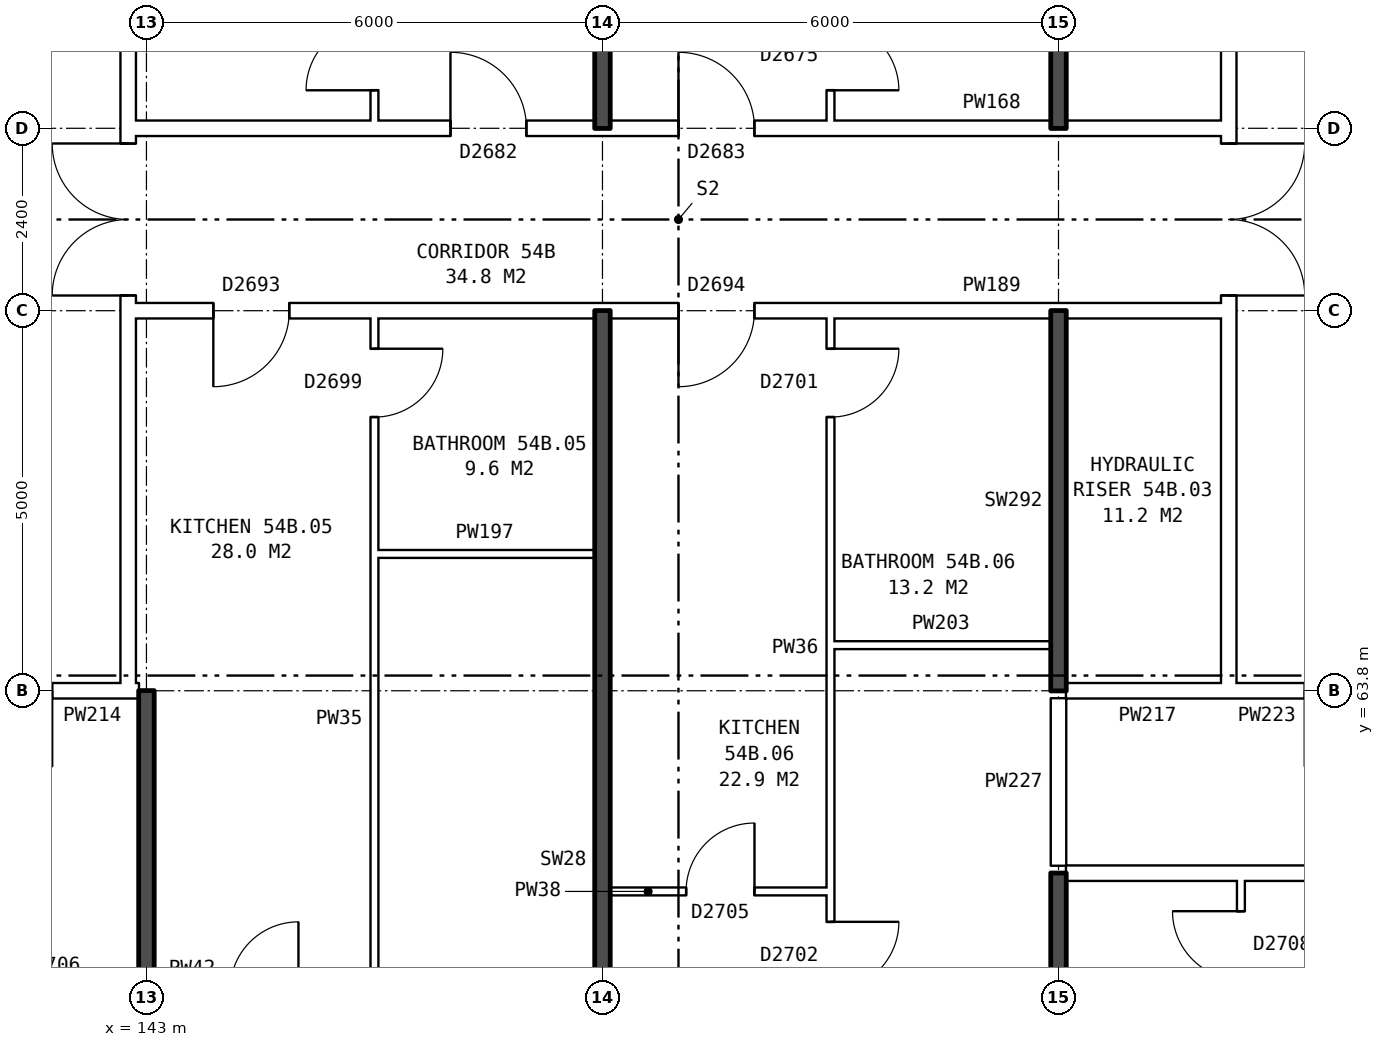
"""IFC4 building model, lengths in metres.
Left out: names, types, materials, properties, quantities, classifications, styles, units other than length and angle.
Written with IfcOpenShell. Run it as: python <this file> out.ifc"""

import sys

from ifc_helpers import new_model, si_unit, direction, frame, frame_2d, origin, place, context, subcontext, project, spatial, rectangle, extrude, element, fill, save


model = new_model("IFC4")
c1 = context("Model", 3, precision=1e-05, world=origin(), true_north=direction((0.0, 1.0)))
c2 = subcontext(c1, "Body", "Model", "MODEL_VIEW")
j1 = project(units=[si_unit("LENGTHUNIT", "METRE"), si_unit("PLANEANGLEUNIT", "RADIAN")], contexts=[c1])
p1 = place(None, origin())
s1 = spatial("IfcSite", under=j1, at=p1, CompositionType="ELEMENT")
p2 = place(p1, origin())
s2 = spatial("IfcBuilding", under=s1, at=p2, CompositionType="ELEMENT")
p3 = place(p2, frame((0.0, 0.0, 191.3)))
s3 = spatial("IfcBuildingStorey", under=s2, at=p3, CompositionType="ELEMENT", Elevation=191.3)
p4 = place(p3, frame((142.76, 63.9, 0.0), z_axis=(0.0, 0.0, 1.0), x_axis=(0.0, 1.0, 0.0)))
e1 = element("IfcWall", 1, at=p4, inside=s3, PredefinedType="PARTITIONING", context=c2, shape_type="SweptSolid", body=[
    extrude(rectangle(XDim=12.2, YDim=0.2, at=frame_2d((6.1, 0.0))), origin(), (0.0, 0.0, 1.0), 2.85),
])
p5 = place(p4, frame((5.1, 0.0, 0.0)))
e2 = element("IfcOpeningElement", 2, at=p5, cuts=e1, PredefinedType="OPENING", context=c2, shape_type="SweptSolid", body=[
    extrude(rectangle(XDim=2.0, YDim=2.1, at=frame_2d((1.0, 1.05))), frame((0.0, 0.11, 0.0), z_axis=(0.0, -1.0, 0.0), x_axis=(1.0, 0.0, 0.0)), (0.0, 0.0, 1.0), 0.22),
])
p6 = place(p3, frame((157.24, 63.9, 0.0), z_axis=(0.0, 0.0, 1.0), x_axis=(0.0, 1.0, 0.0)))
e3 = element("IfcWall", 3, at=p6, inside=s3, PredefinedType="PARTITIONING", context=c2, shape_type="SweptSolid", body=[
    extrude(rectangle(XDim=12.2, YDim=0.2, at=frame_2d((6.1, 0.0))), origin(), (0.0, 0.0, 1.0), 2.85),
])
p7 = place(p6, frame((5.1, 0.0, 0.0)))
e4 = element("IfcOpeningElement", 4, at=p7, cuts=e3, PredefinedType="OPENING", context=c2, shape_type="SweptSolid", body=[
    extrude(rectangle(XDim=2.0, YDim=2.1, at=frame_2d((1.0, 1.05))), frame((0.0, 0.11, 0.0), z_axis=(0.0, -1.0, 0.0), x_axis=(1.0, 0.0, 0.0)), (0.0, 0.0, 1.0), 0.22),
])
p8 = place(p3, frame((149.1, 61.16, 0.0), z_axis=(0.0, 0.0, 1.0), x_axis=(1.0, 0.0, 0.0)))
e5 = element("IfcWall", 5, at=p8, inside=s3, PredefinedType="PARTITIONING", context=c2, shape_type="SweptSolid", body=[
    extrude(rectangle(XDim=2.9, YDim=0.1, at=frame_2d((1.45, 0.0))), origin(), (0.0, 0.0, 1.0), 2.85),
])
p9 = place(p8, frame((1.0, 0.0, 0.0)))
e6 = element("IfcOpeningElement", 6, at=p9, cuts=e5, PredefinedType="OPENING", context=c2, shape_type="SweptSolid", body=[
    extrude(rectangle(XDim=0.9, YDim=2.1, at=frame_2d((0.45, 1.05))), frame((0.0, 0.06, 0.0), z_axis=(0.0, -1.0, 0.0), x_axis=(1.0, 0.0, 0.0)), (0.0, 0.0, 1.0), 0.12),
])
p10 = place(p3, frame((155.1, 61.4, 0.0), z_axis=(0.0, 0.0, 1.0), x_axis=(1.0, 0.0, 0.0)))
e7 = element("IfcWall", 7, at=p10, inside=s3, PredefinedType="PARTITIONING", context=c2, shape_type="SweptSolid", body=[
    extrude(rectangle(XDim=14.79, YDim=0.2, at=frame_2d((7.395, 0.0))), origin(), (0.0, 0.0, 1.0), 2.85),
])
p11 = place(p10, frame((3.6, 0.0, 0.0)))
e8 = element("IfcOpeningElement", 8, at=p11, cuts=e7, PredefinedType="OPENING", context=c2, shape_type="SweptSolid", body=[
    extrude(rectangle(XDim=1.0, YDim=2.1, at=frame_2d((0.5, 1.05))), frame((0.0, 0.11, 0.0), z_axis=(0.0, -1.0, 0.0), x_axis=(1.0, 0.0, 0.0)), (0.0, 0.0, 1.0), 0.22),
])
p12 = place(p10, frame((11.045, 0.0, 0.0)))
e9 = element("IfcOpeningElement", 9, at=p12, cuts=e7, PredefinedType="OPENING", context=c2, shape_type="SweptSolid", body=[
    extrude(rectangle(XDim=1.0, YDim=2.1, at=frame_2d((0.5, 1.05))), frame((0.0, 0.11, 0.0), z_axis=(0.0, -1.0, 0.0), x_axis=(1.0, 0.0, 0.0)), (0.0, 0.0, 1.0), 0.22),
])
p13 = place(p3, frame((139.76, 63.8, 0.0), z_axis=(0.0, 0.0, 1.0), x_axis=(1.0, 0.0, 0.0)))
e10 = element("IfcWall", 10, at=p13, inside=s3, PredefinedType="PARTITIONING", context=c2, shape_type="SweptSolid", body=[
    extrude(rectangle(XDim=3.0, YDim=0.2, at=frame_2d((1.5, 0.0))), origin(), (0.0, 0.0, 1.0), 2.85),
])
p14 = place(p13, frame((1.0, 0.0, 0.0)))
e11 = element("IfcOpeningElement", 11, at=p14, cuts=e10, PredefinedType="OPENING", context=c2, shape_type="SweptSolid", body=[
    extrude(rectangle(XDim=1.0, YDim=2.1, at=frame_2d((0.5, 1.05))), frame((0.0, 0.11, 0.0), z_axis=(0.0, -1.0, 0.0), x_axis=(1.0, 0.0, 0.0)), (0.0, 0.0, 1.0), 0.22),
])
p15 = place(p3, frame((142.76, 63.8, 0.0), z_axis=(0.0, 0.0, 1.0), x_axis=(1.0, 0.0, 0.0)))
e12 = element("IfcWall", 12, at=p15, inside=s3, PredefinedType="PARTITIONING", context=c2, shape_type="SweptSolid", body=[
    extrude(rectangle(XDim=0.14, YDim=0.2, at=frame_2d((0.07, 0.0))), origin(), (0.0, 0.0, 1.0), 2.85),
])
p16 = place(p3, frame((155.1, 63.8, 0.0), z_axis=(0.0, 0.0, 1.0), x_axis=(1.0, 0.0, 0.0)))
e13 = element("IfcWall", 13, at=p16, inside=s3, PredefinedType="PARTITIONING", context=c2, shape_type="SweptSolid", body=[
    extrude(rectangle(XDim=2.14, YDim=0.2, at=frame_2d((1.07, 0.0))), origin(), (0.0, 0.0, 1.0), 2.85),
])
p17 = place(p3, frame((157.24, 63.8, 0.0), z_axis=(0.0, 0.0, 1.0), x_axis=(1.0, 0.0, 0.0)))
e14 = element("IfcWall", 14, at=p17, inside=s3, PredefinedType="PARTITIONING", context=c2, shape_type="SweptSolid", body=[
    extrude(rectangle(XDim=3.0, YDim=0.2, at=frame_2d((1.5, 0.0))), origin(), (0.0, 0.0, 1.0), 2.85),
])
p18 = place(p17, frame((1.0, 0.0, 0.0)))
e15 = element("IfcOpeningElement", 15, at=p18, cuts=e14, PredefinedType="OPENING", context=c2, shape_type="SweptSolid", body=[
    extrude(rectangle(XDim=1.0, YDim=2.1, at=frame_2d((0.5, 1.05))), frame((0.0, 0.11, 0.0), z_axis=(0.0, -1.0, 0.0), x_axis=(1.0, 0.0, 0.0)), (0.0, 0.0, 1.0), 0.22),
])
for number, where, z_axis, x_axis in (
    (16, (152.0, 64.4, 0.0), (0.0, 0.0, 1.0), (1.0, 0.0, 0.0)),
    (17, (146.0, 65.6, 0.0), (0.0, 0.0, 1.0), (1.0, 0.0, 0.0)),
):
    element("IfcWall", number, at=place(p3, frame(where, z_axis=z_axis, x_axis=x_axis)), inside=s3, PredefinedType="PARTITIONING", context=c2, shape_type="SweptSolid", body=[
        extrude(rectangle(XDim=2.9, YDim=0.1, at=frame_2d((1.45, 0.0))), origin(), (0.0, 0.0, 1.0), 2.85),
    ])
p19 = place(p3, frame((142.76, 68.8, 0.0), z_axis=(0.0, 0.0, 1.0), x_axis=(1.0, 0.0, 0.0)))
e18 = element("IfcWall", 18, at=p19, inside=s3, PredefinedType="PARTITIONING", context=c2, shape_type="SweptSolid", body=[
    extrude(rectangle(XDim=14.48, YDim=0.2, at=frame_2d((7.24, 0.0))), origin(), (0.0, 0.0, 1.0), 2.85),
])
p20 = place(p19, frame((1.12, 0.0, 0.0)))
e19 = element("IfcOpeningElement", 19, at=p20, cuts=e18, PredefinedType="OPENING", context=c2, shape_type="SweptSolid", body=[
    extrude(rectangle(XDim=1.0, YDim=2.1, at=frame_2d((0.5, 1.05))), frame((0.0, 0.11, 0.0), z_axis=(0.0, -1.0, 0.0), x_axis=(1.0, 0.0, 0.0)), (0.0, 0.0, 1.0), 0.22),
])
p21 = place(p19, frame((7.24, 0.0, 0.0)))
e20 = element("IfcOpeningElement", 20, at=p21, cuts=e18, PredefinedType="OPENING", context=c2, shape_type="SweptSolid", body=[
    extrude(rectangle(XDim=1.0, YDim=2.1, at=frame_2d((0.5, 1.05))), frame((0.0, 0.11, 0.0), z_axis=(0.0, -1.0, 0.0), x_axis=(1.0, 0.0, 0.0)), (0.0, 0.0, 1.0), 0.22),
])
p22 = place(p3, frame((142.76, 71.2, 0.0), z_axis=(0.0, 0.0, 1.0), x_axis=(1.0, 0.0, 0.0)))
e21 = element("IfcWall", 21, at=p22, inside=s3, PredefinedType="PARTITIONING", context=c2, shape_type="SweptSolid", body=[
    extrude(rectangle(XDim=14.48, YDim=0.2, at=frame_2d((7.24, 0.0))), origin(), (0.0, 0.0, 1.0), 2.85),
])
p23 = place(p22, frame((4.24, 0.0, 0.0)))
e22 = element("IfcOpeningElement", 22, at=p23, cuts=e21, PredefinedType="OPENING", context=c2, shape_type="SweptSolid", body=[
    extrude(rectangle(XDim=1.0, YDim=2.1, at=frame_2d((0.5, 1.05))), frame((0.0, 0.11, 0.0), z_axis=(0.0, -1.0, 0.0), x_axis=(1.0, 0.0, 0.0)), (0.0, 0.0, 1.0), 0.22),
])
p24 = place(p22, frame((7.24, 0.0, 0.0)))
e23 = element("IfcOpeningElement", 23, at=p24, cuts=e21, PredefinedType="OPENING", context=c2, shape_type="SweptSolid", body=[
    extrude(rectangle(XDim=1.0, YDim=2.1, at=frame_2d((0.5, 1.05))), frame((0.0, 0.11, 0.0), z_axis=(0.0, -1.0, 0.0), x_axis=(1.0, 0.0, 0.0)), (0.0, 0.0, 1.0), 0.22),
])
p25 = place(p3, frame((143.0, 54.36, 0.0), z_axis=(0.0, 0.0, 1.0), x_axis=(0.0, 1.0, 0.0)))
e24 = element("IfcWall", 24, at=p25, inside=s3, PredefinedType="SOLIDWALL", context=c2, shape_type="SweptSolid", body=[
    extrude(rectangle(XDim=9.44, YDim=0.2, at=frame_2d((4.72, 0.0))), origin(), (0.0, 0.0, 1.0), 2.85),
])
p26 = place(p3, frame((146.0, 54.36, 0.0), z_axis=(0.0, 0.0, 1.0), x_axis=(0.0, 1.0, 0.0)))
e25 = element("IfcWall", 25, at=p26, inside=s3, PredefinedType="PARTITIONING", context=c2, shape_type="SweptSolid", body=[
    extrude(rectangle(XDim=14.34, YDim=0.1, at=frame_2d((7.17, 0.0))), origin(), (0.0, 0.0, 1.0), 2.85),
])
p27 = place(p26, frame((4.2, 0.0, 0.0)))
e26 = element("IfcOpeningElement", 26, at=p27, cuts=e25, PredefinedType="OPENING", context=c2, shape_type="SweptSolid", body=[
    extrude(rectangle(XDim=0.9, YDim=2.1, at=frame_2d((0.45, 1.05))), frame((0.0, 0.06, 0.0), z_axis=(0.0, -1.0, 0.0), x_axis=(1.0, 0.0, 0.0)), (0.0, 0.0, 1.0), 0.12),
])
p28 = place(p26, frame((13.04, 0.0, 0.0)))
e27 = element("IfcOpeningElement", 27, at=p28, cuts=e25, PredefinedType="OPENING", context=c2, shape_type="SweptSolid", body=[
    extrude(rectangle(XDim=0.9, YDim=2.1, at=frame_2d((0.45, 1.05))), frame((0.0, 0.06, 0.0), z_axis=(0.0, -1.0, 0.0), x_axis=(1.0, 0.0, 0.0)), (0.0, 0.0, 1.0), 0.12),
])
p29 = place(p3, frame((146.0, 71.3, 0.0), z_axis=(0.0, 0.0, 1.0), x_axis=(0.0, 1.0, 0.0)))
e28 = element("IfcWall", 28, at=p29, inside=s3, PredefinedType="PARTITIONING", context=c2, shape_type="SweptSolid", body=[
    extrude(rectangle(XDim=14.34, YDim=0.1, at=frame_2d((7.17, 0.0))), origin(), (0.0, 0.0, 1.0), 2.85),
])
p30 = place(p29, frame((5.74, 0.0, 0.0)))
e29 = element("IfcOpeningElement", 29, at=p30, cuts=e28, PredefinedType="OPENING", context=c2, shape_type="SweptSolid", body=[
    extrude(rectangle(XDim=0.9, YDim=2.1, at=frame_2d((0.45, 1.05))), frame((0.0, 0.06, 0.0), z_axis=(0.0, -1.0, 0.0), x_axis=(1.0, 0.0, 0.0)), (0.0, 0.0, 1.0), 0.12),
])
p31 = place(p29, frame((0.4, 0.0, 0.0)))
e30 = element("IfcOpeningElement", 30, at=p31, cuts=e28, PredefinedType="OPENING", context=c2, shape_type="SweptSolid", body=[
    extrude(rectangle(XDim=0.9, YDim=2.1, at=frame_2d((0.45, 1.05))), frame((0.0, 0.06, 0.0), z_axis=(0.0, -1.0, 0.0), x_axis=(1.0, 0.0, 0.0)), (0.0, 0.0, 1.0), 0.12),
])
for number, where, z_axis, x_axis in (
    (31, (149.0, 54.36, 0.0), (0.0, 0.0, 1.0), (0.0, 1.0, 0.0)),
    (32, (149.0, 71.2, 0.0), (0.0, 0.0, 1.0), (0.0, 1.0, 0.0)),
):
    element("IfcWall", number, at=place(p3, frame(where, z_axis=z_axis, x_axis=x_axis)), inside=s3, PredefinedType="SOLIDWALL", context=c2, shape_type="SweptSolid", body=[
        extrude(rectangle(XDim=14.44, YDim=0.2, at=frame_2d((7.22, 0.0))), origin(), (0.0, 0.0, 1.0), 2.85),
    ])
p32 = place(p3, frame((152.0, 54.36, 0.0), z_axis=(0.0, 0.0, 1.0), x_axis=(0.0, 1.0, 0.0)))
e33 = element("IfcWall", 33, at=p32, inside=s3, PredefinedType="PARTITIONING", context=c2, shape_type="SweptSolid", body=[
    extrude(rectangle(XDim=14.34, YDim=0.1, at=frame_2d((7.17, 0.0))), origin(), (0.0, 0.0, 1.0), 2.85),
])
p33 = place(p32, frame((5.5, 0.0, 0.0)))
e34 = element("IfcOpeningElement", 34, at=p33, cuts=e33, PredefinedType="OPENING", context=c2, shape_type="SweptSolid", body=[
    extrude(rectangle(XDim=0.9, YDim=2.1, at=frame_2d((0.45, 1.05))), frame((0.0, 0.06, 0.0), z_axis=(0.0, -1.0, 0.0), x_axis=(1.0, 0.0, 0.0)), (0.0, 0.0, 1.0), 0.12),
])
p34 = place(p32, frame((13.04, 0.0, 0.0)))
e35 = element("IfcOpeningElement", 35, at=p34, cuts=e33, PredefinedType="OPENING", context=c2, shape_type="SweptSolid", body=[
    extrude(rectangle(XDim=0.9, YDim=2.1, at=frame_2d((0.45, 1.05))), frame((0.0, 0.06, 0.0), z_axis=(0.0, -1.0, 0.0), x_axis=(1.0, 0.0, 0.0)), (0.0, 0.0, 1.0), 0.12),
])
p35 = place(p3, frame((152.0, 71.3, 0.0), z_axis=(0.0, 0.0, 1.0), x_axis=(0.0, 1.0, 0.0)))
e36 = element("IfcWall", 36, at=p35, inside=s3, PredefinedType="PARTITIONING", context=c2, shape_type="SweptSolid", body=[
    extrude(rectangle(XDim=14.34, YDim=0.1, at=frame_2d((7.17, 0.0))), origin(), (0.0, 0.0, 1.0), 2.85),
])
p36 = place(p35, frame((7.94, 0.0, 0.0)))
e37 = element("IfcOpeningElement", 37, at=p36, cuts=e36, PredefinedType="OPENING", context=c2, shape_type="SweptSolid", body=[
    extrude(rectangle(XDim=0.9, YDim=2.1, at=frame_2d((0.45, 1.05))), frame((0.0, 0.06, 0.0), z_axis=(0.0, -1.0, 0.0), x_axis=(1.0, 0.0, 0.0)), (0.0, 0.0, 1.0), 0.12),
])
p37 = place(p35, frame((0.4, 0.0, 0.0)))
e38 = element("IfcOpeningElement", 38, at=p37, cuts=e36, PredefinedType="OPENING", context=c2, shape_type="SweptSolid", body=[
    extrude(rectangle(XDim=0.9, YDim=2.1, at=frame_2d((0.45, 1.05))), frame((0.0, 0.06, 0.0), z_axis=(0.0, -1.0, 0.0), x_axis=(1.0, 0.0, 0.0)), (0.0, 0.0, 1.0), 0.12),
])
p38 = place(p3, frame((155.0, 54.36, 0.0), z_axis=(0.0, 0.0, 1.0), x_axis=(0.0, 1.0, 0.0)))
e39 = element("IfcWall", 39, at=p38, inside=s3, PredefinedType="SOLIDWALL", context=c2, shape_type="SweptSolid", body=[
    extrude(rectangle(XDim=7.04, YDim=0.2, at=frame_2d((3.52, 0.0))), origin(), (0.0, 0.0, 1.0), 2.85),
])
p39 = place(p3, frame((155.0, 61.5, 0.0), z_axis=(0.0, 0.0, 1.0), x_axis=(0.0, 1.0, 0.0)))
e40 = element("IfcWall", 40, at=p39, inside=s3, PredefinedType="PARTITIONING", context=c2, shape_type="SweptSolid", body=[
    extrude(rectangle(XDim=2.2, YDim=0.2, at=frame_2d((1.1, 0.0))), origin(), (0.0, 0.0, 1.0), 2.85),
])
for number, where, z_axis, x_axis in (
    (41, (155.0, 63.8, 0.0), (0.0, 0.0, 1.0), (0.0, 1.0, 0.0)),
    (42, (155.0, 71.2, 0.0), (0.0, 0.0, 1.0), (0.0, 1.0, 0.0)),
):
    element("IfcWall", number, at=place(p3, frame(where, z_axis=z_axis, x_axis=x_axis)), inside=s3, PredefinedType="SOLIDWALL", context=c2, shape_type="SweptSolid", body=[
        extrude(rectangle(XDim=5.0, YDim=0.2, at=frame_2d((2.5, 0.0))), origin(), (0.0, 0.0, 1.0), 2.85),
    ])
p40 = place(p3, frame((157.4, 58.45, 0.0), z_axis=(0.0, 0.0, 1.0), x_axis=(0.0, 1.0, 0.0)))
e43 = element("IfcWall", 43, at=p40, inside=s3, PredefinedType="PARTITIONING", context=c2, shape_type="SweptSolid", body=[
    extrude(rectangle(XDim=2.85, YDim=0.1, at=frame_2d((1.425, 0.0))), origin(), (0.0, 0.0, 1.0), 2.85),
])
p41 = place(p40, frame((1.55, 0.0, 0.0)))
e44 = element("IfcOpeningElement", 44, at=p41, cuts=e43, PredefinedType="OPENING", context=c2, shape_type="SweptSolid", body=[
    extrude(rectangle(XDim=0.9, YDim=2.1, at=frame_2d((0.45, 1.05))), frame((0.0, 0.06, 0.0), z_axis=(0.0, -1.0, 0.0), x_axis=(1.0, 0.0, 0.0)), (0.0, 0.0, 1.0), 0.12),
])
p42 = place(p5, origin())
e45 = element("IfcDoor", 45, at=p42, inside=s3, OperationType="DOUBLE_DOOR_SINGLE_SWING", PredefinedType="DOOR", context=c2, shape_type="SweptSolid", body=[
    extrude(rectangle(XDim=2.0, YDim=2.1, at=frame_2d((1.0, 1.05))), frame((0.0, 0.025, 0.0), z_axis=(0.0, -1.0, 0.0), x_axis=(1.0, 0.0, 0.0)), (0.0, 0.0, 1.0), 0.05),
])
fill(e2, e45)
p43 = place(p7, frame((2.0, 0.0, 0.0), z_axis=(0.0, 0.0, 1.0), x_axis=(-1.0, 0.0, 0.0)))
e46 = element("IfcDoor", 46, at=p43, inside=s3, OperationType="DOUBLE_DOOR_SINGLE_SWING", PredefinedType="DOOR", context=c2, shape_type="SweptSolid", body=[
    extrude(rectangle(XDim=2.0, YDim=2.1, at=frame_2d((1.0, 1.05))), frame((0.0, 0.025, 0.0), z_axis=(0.0, -1.0, 0.0), x_axis=(1.0, 0.0, 0.0)), (0.0, 0.0, 1.0), 0.05),
])
fill(e4, e46)
p44 = place(p20, frame((1.0, 0.0, 0.0), z_axis=(0.0, 0.0, 1.0), x_axis=(-1.0, 0.0, 0.0)))
e47 = element("IfcDoor", 47, at=p44, inside=s3, OperationType="SINGLE_SWING_RIGHT", PredefinedType="DOOR", context=c2, shape_type="SweptSolid", body=[
    extrude(rectangle(XDim=1.0, YDim=2.1, at=frame_2d((0.5, 1.05))), frame((0.0, 0.025, 0.0), z_axis=(0.0, -1.0, 0.0), x_axis=(1.0, 0.0, 0.0)), (0.0, 0.0, 1.0), 0.05),
])
fill(e19, e47)
p45 = place(p28, frame((0.9, 0.0, 0.0), z_axis=(0.0, 0.0, 1.0), x_axis=(-1.0, 0.0, 0.0)))
e48 = element("IfcDoor", 48, at=p45, inside=s3, OperationType="SINGLE_SWING_LEFT", PredefinedType="DOOR", context=c2, shape_type="SweptSolid", body=[
    extrude(rectangle(XDim=0.9, YDim=2.1, at=frame_2d((0.45, 1.05))), frame((0.0, 0.025, 0.0), z_axis=(0.0, -1.0, 0.0), x_axis=(1.0, 0.0, 0.0)), (0.0, 0.0, 1.0), 0.05),
])
fill(e27, e48)
p46 = place(p33, frame((0.9, 0.0, 0.0), z_axis=(0.0, 0.0, 1.0), x_axis=(-1.0, 0.0, 0.0)))
e49 = element("IfcDoor", 49, at=p46, inside=s3, OperationType="SINGLE_SWING_LEFT", PredefinedType="DOOR", context=c2, shape_type="SweptSolid", body=[
    extrude(rectangle(XDim=0.9, YDim=2.1, at=frame_2d((0.45, 1.05))), frame((0.0, 0.025, 0.0), z_axis=(0.0, -1.0, 0.0), x_axis=(1.0, 0.0, 0.0)), (0.0, 0.0, 1.0), 0.05),
])
fill(e34, e49)
p47 = place(p21, frame((1.0, 0.0, 0.0), z_axis=(0.0, 0.0, 1.0), x_axis=(-1.0, 0.0, 0.0)))
e50 = element("IfcDoor", 50, at=p47, inside=s3, OperationType="SINGLE_SWING_RIGHT", PredefinedType="DOOR", context=c2, shape_type="SweptSolid", body=[
    extrude(rectangle(XDim=1.0, YDim=2.1, at=frame_2d((0.5, 1.05))), frame((0.0, 0.025, 0.0), z_axis=(0.0, -1.0, 0.0), x_axis=(1.0, 0.0, 0.0)), (0.0, 0.0, 1.0), 0.05),
])
fill(e20, e50)
p48 = place(p9, origin())
e51 = element("IfcDoor", 51, at=p48, inside=s3, OperationType="SINGLE_SWING_RIGHT", PredefinedType="DOOR", context=c2, shape_type="SweptSolid", body=[
    extrude(rectangle(XDim=0.9, YDim=2.1, at=frame_2d((0.45, 1.05))), frame((0.0, 0.025, 0.0), z_axis=(0.0, -1.0, 0.0), x_axis=(1.0, 0.0, 0.0)), (0.0, 0.0, 1.0), 0.05),
])
fill(e6, e51)
p49 = place(p34, frame((0.9, 0.0, 0.0), z_axis=(0.0, 0.0, 1.0), x_axis=(-1.0, 0.0, 0.0)))
e52 = element("IfcDoor", 52, at=p49, inside=s3, OperationType="SINGLE_SWING_LEFT", PredefinedType="DOOR", context=c2, shape_type="SweptSolid", body=[
    extrude(rectangle(XDim=0.9, YDim=2.1, at=frame_2d((0.45, 1.05))), frame((0.0, 0.025, 0.0), z_axis=(0.0, -1.0, 0.0), x_axis=(1.0, 0.0, 0.0)), (0.0, 0.0, 1.0), 0.05),
])
fill(e35, e52)
p50 = place(p23, origin())
e53 = element("IfcDoor", 53, at=p50, inside=s3, OperationType="SINGLE_SWING_LEFT", PredefinedType="DOOR", context=c2, shape_type="SweptSolid", body=[
    extrude(rectangle(XDim=1.0, YDim=2.1, at=frame_2d((0.5, 1.05))), frame((0.0, 0.025, 0.0), z_axis=(0.0, -1.0, 0.0), x_axis=(1.0, 0.0, 0.0)), (0.0, 0.0, 1.0), 0.05),
])
fill(e22, e53)
p51 = place(p31, origin())
e54 = element("IfcDoor", 54, at=p51, inside=s3, OperationType="SINGLE_SWING_LEFT", PredefinedType="DOOR", context=c2, shape_type="SweptSolid", body=[
    extrude(rectangle(XDim=0.9, YDim=2.1, at=frame_2d((0.45, 1.05))), frame((0.0, 0.025, 0.0), z_axis=(0.0, -1.0, 0.0), x_axis=(1.0, 0.0, 0.0)), (0.0, 0.0, 1.0), 0.05),
])
fill(e30, e54)
p52 = place(p24, origin())
e55 = element("IfcDoor", 55, at=p52, inside=s3, OperationType="SINGLE_SWING_LEFT", PredefinedType="DOOR", context=c2, shape_type="SweptSolid", body=[
    extrude(rectangle(XDim=1.0, YDim=2.1, at=frame_2d((0.5, 1.05))), frame((0.0, 0.025, 0.0), z_axis=(0.0, -1.0, 0.0), x_axis=(1.0, 0.0, 0.0)), (0.0, 0.0, 1.0), 0.05),
])
fill(e23, e55)
p53 = place(p37, frame((0.9, 0.0, 0.0), z_axis=(0.0, 0.0, 1.0), x_axis=(-1.0, 0.0, 0.0)))
e56 = element("IfcDoor", 56, at=p53, inside=s3, OperationType="SINGLE_SWING_RIGHT", PredefinedType="DOOR", context=c2, shape_type="SweptSolid", body=[
    extrude(rectangle(XDim=0.9, YDim=2.1, at=frame_2d((0.45, 1.05))), frame((0.0, 0.025, 0.0), z_axis=(0.0, -1.0, 0.0), x_axis=(1.0, 0.0, 0.0)), (0.0, 0.0, 1.0), 0.05),
])
fill(e38, e56)
p54 = place(p41, origin())
e57 = element("IfcDoor", 57, at=p54, inside=s3, OperationType="SINGLE_SWING_RIGHT", PredefinedType="DOOR", context=c2, shape_type="SweptSolid", body=[
    extrude(rectangle(XDim=0.9, YDim=2.1, at=frame_2d((0.45, 1.05))), frame((0.0, 0.025, 0.0), z_axis=(0.0, -1.0, 0.0), x_axis=(1.0, 0.0, 0.0)), (0.0, 0.0, 1.0), 0.05),
])
fill(e44, e57)
save(model, sys.argv[1])
